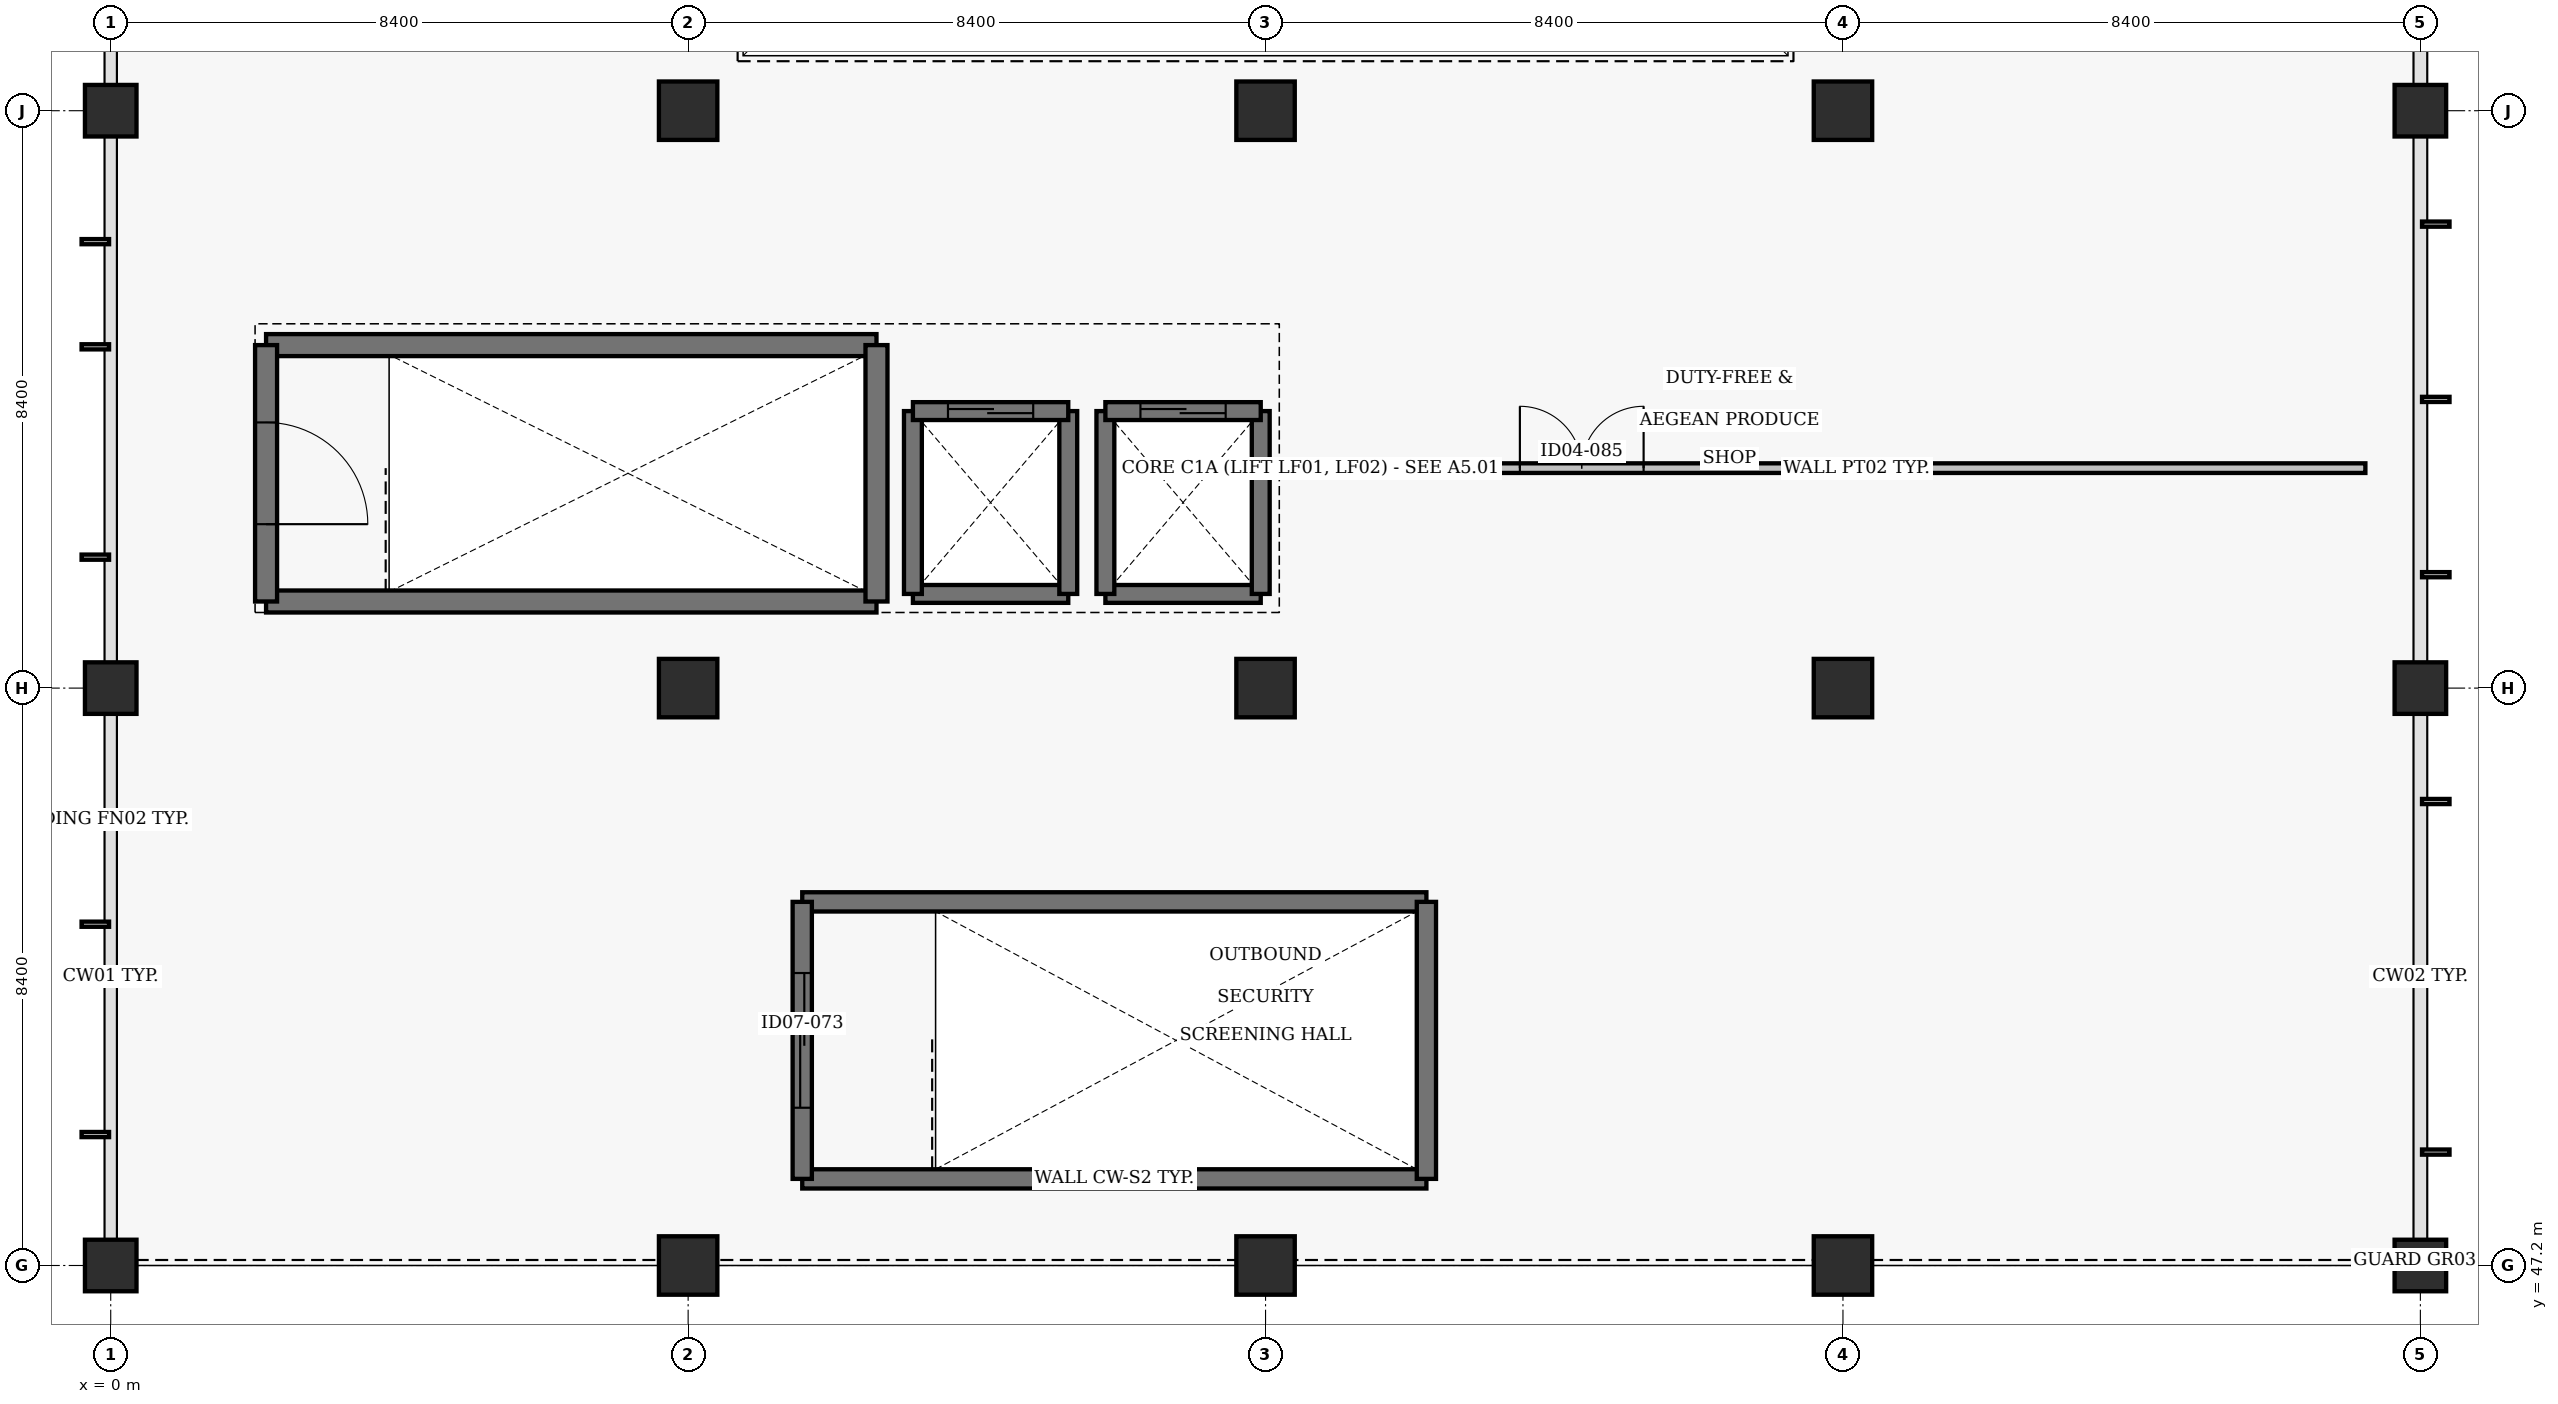
"""IFC4 building model, lengths in metres.
Left out: names, types, materials, properties, quantities, classifications, styles, units other than length and angle.
Written with IfcOpenShell. Run it as: python <this file> out.ifc"""

import sys

from ifc_helpers import new_model, si_unit, direction, frame, frame_2d, origin, origin_2d, place, context, subcontext, project, spatial, rectangle, circle, extrude, element, fill, save


model = new_model("IFC4")
c1 = context("Model", 3, precision=1e-05, world=origin(), true_north=direction((0.0, 1.0)))
c2 = subcontext(c1, "Body", "Model", "MODEL_VIEW")
j1 = project(units=[si_unit("LENGTHUNIT", "METRE"), si_unit("PLANEANGLEUNIT", "RADIAN")], contexts=[c1])
p1 = place(None, origin())
s1 = spatial("IfcSite", under=j1, at=p1, CompositionType="ELEMENT")
p2 = place(p1, origin())
s2 = spatial("IfcBuilding", under=s1, at=p2, CompositionType="ELEMENT")
p3 = place(p2, frame((0.0, 0.0, 5.44)))
s3 = spatial("IfcBuildingStorey", under=s2, at=p3, CompositionType="ELEMENT", Elevation=5.44)
for number, where, z_axis, x_axis in (
    (1, (0.0, 47.2, 0.0), (0.0, 0.0, 1.0), (1.0, 0.0, 0.0)),
    (2, (0.0, 55.6, 0.0), (0.0, 0.0, 1.0), (1.0, 0.0, 0.0)),
    (3, (0.0, 64.0, 0.0), (0.0, 0.0, 1.0), (1.0, 0.0, 0.0)),
):
    element("IfcColumn", number, at=place(p3, frame(where, z_axis=z_axis, x_axis=x_axis)), inside=s3, PredefinedType="COLUMN", context=c2, shape_type="SweptSolid", body=[
        extrude(rectangle(XDim=0.75, YDim=0.75, at=origin_2d()), origin(), (0.0, 0.0, 1.0), 4.16),
    ])
p4 = place(p3, frame((8.4, 47.2, 0.0), z_axis=(0.0, 0.0, 1.0), x_axis=(1.0, 0.0, 0.0)))
e4 = element("IfcColumn", 4, at=p4, inside=s3, PredefinedType="COLUMN", context=c2, shape_type="SweptSolid", body=[
    extrude(circle(Radius=0.425, at=origin_2d()), origin(), (0.0, 0.0, 1.0), 7.582),
])
p5 = place(p3, frame((8.4, 55.6, 0.0), z_axis=(0.0, 0.0, 1.0), x_axis=(1.0, 0.0, 0.0)))
e5 = element("IfcColumn", 5, at=p5, inside=s3, PredefinedType="COLUMN", context=c2, shape_type="SweptSolid", body=[
    extrude(circle(Radius=0.425, at=origin_2d()), origin(), (0.0, 0.0, 1.0), 8.296),
])
p6 = place(p3, frame((8.4, 64.0, 0.0), z_axis=(0.0, 0.0, 1.0), x_axis=(1.0, 0.0, 0.0)))
e6 = element("IfcColumn", 6, at=p6, inside=s3, PredefinedType="COLUMN", context=c2, shape_type="SweptSolid", body=[
    extrude(circle(Radius=0.425, at=origin_2d()), origin(), (0.0, 0.0, 1.0), 9.01),
])
p7 = place(p3, frame((16.8, 47.2, 0.0), z_axis=(0.0, 0.0, 1.0), x_axis=(1.0, 0.0, 0.0)))
e7 = element("IfcColumn", 7, at=p7, inside=s3, PredefinedType="COLUMN", context=c2, shape_type="SweptSolid", body=[
    extrude(circle(Radius=0.425, at=origin_2d()), origin(), (0.0, 0.0, 1.0), 10.06),
])
p8 = place(p3, frame((16.8, 55.6, 0.0), z_axis=(0.0, 0.0, 1.0), x_axis=(1.0, 0.0, 0.0)))
e8 = element("IfcColumn", 8, at=p8, inside=s3, PredefinedType="COLUMN", context=c2, shape_type="SweptSolid", body=[
    extrude(circle(Radius=0.425, at=origin_2d()), origin(), (0.0, 0.0, 1.0), 10.774),
])
p9 = place(p3, frame((16.8, 64.0, 0.0), z_axis=(0.0, 0.0, 1.0), x_axis=(1.0, 0.0, 0.0)))
e9 = element("IfcColumn", 9, at=p9, inside=s3, PredefinedType="COLUMN", context=c2, shape_type="SweptSolid", body=[
    extrude(circle(Radius=0.425, at=origin_2d()), origin(), (0.0, 0.0, 1.0), 11.489),
])
p10 = place(p3, frame((25.2, 47.2, 0.0), z_axis=(0.0, 0.0, 1.0), x_axis=(1.0, 0.0, 0.0)))
e10 = element("IfcColumn", 10, at=p10, inside=s3, PredefinedType="COLUMN", context=c2, shape_type="SweptSolid", body=[
    extrude(circle(Radius=0.425, at=origin_2d()), origin(), (0.0, 0.0, 1.0), 7.582),
])
p11 = place(p3, frame((25.2, 55.6, 0.0), z_axis=(0.0, 0.0, 1.0), x_axis=(1.0, 0.0, 0.0)))
e11 = element("IfcColumn", 11, at=p11, inside=s3, PredefinedType="COLUMN", context=c2, shape_type="SweptSolid", body=[
    extrude(circle(Radius=0.425, at=origin_2d()), origin(), (0.0, 0.0, 1.0), 8.296),
])
p12 = place(p3, frame((25.2, 64.0, 0.0), z_axis=(0.0, 0.0, 1.0), x_axis=(1.0, 0.0, 0.0)))
e12 = element("IfcColumn", 12, at=p12, inside=s3, PredefinedType="COLUMN", context=c2, shape_type="SweptSolid", body=[
    extrude(circle(Radius=0.425, at=origin_2d()), origin(), (0.0, 0.0, 1.0), 9.01),
])
for number, where, z_axis, x_axis in (
    (13, (33.6, 47.2, 0.0), (0.0, 0.0, 1.0), (1.0, 0.0, 0.0)),
    (14, (33.6, 55.6, 0.0), (0.0, 0.0, 1.0), (1.0, 0.0, 0.0)),
    (15, (33.6, 64.0, 0.0), (0.0, 0.0, 1.0), (1.0, 0.0, 0.0)),
):
    element("IfcColumn", number, at=place(p3, frame(where, z_axis=z_axis, x_axis=x_axis)), inside=s3, PredefinedType="COLUMN", context=c2, shape_type="SweptSolid", body=[
        extrude(rectangle(XDim=0.75, YDim=0.75, at=origin_2d()), origin(), (0.0, 0.0, 1.0), 4.16),
    ])
for number, where, z_axis, x_axis in (
    (16, (2.26, 56.86, 0.0), (0.0, 0.0, 1.0), (1.0, 0.0, 0.0)),
    (17, (2.26, 60.59, 0.0), (0.0, 0.0, 1.0), (1.0, 0.0, 0.0)),
):
    element("IfcWall", number, at=place(p3, frame(where, z_axis=z_axis, x_axis=x_axis)), inside=s3, PredefinedType="SHEAR", context=c2, shape_type="SweptSolid", body=[
        extrude(rectangle(XDim=8.88, YDim=0.32, at=frame_2d((4.44, 0.0))), origin(), (0.0, 0.0, 1.0), 4.16),
    ])
p13 = place(p3, frame((2.26, 60.59, 0.0), z_axis=(0.0, 0.0, 1.0), x_axis=(0.0, -1.0, 0.0)))
e18 = element("IfcWall", 18, at=p13, inside=s3, PredefinedType="SHEAR", context=c2, shape_type="SweptSolid", body=[
    extrude(rectangle(XDim=3.73, YDim=0.32, at=frame_2d((1.865, 0.0))), origin(), (0.0, 0.0, 1.0), 4.16),
])
p14 = place(p13, frame((1.125, 0.0, 0.0)))
e19 = element("IfcOpeningElement", 19, at=p14, cuts=e18, PredefinedType="OPENING", context=c2, shape_type="SweptSolid", body=[
    extrude(rectangle(XDim=1.48, YDim=2.15, at=frame_2d((0.74, 1.075))), frame((0.0, 0.17, 0.0), z_axis=(0.0, -1.0, 0.0), x_axis=(1.0, 0.0, 0.0)), (0.0, 0.0, 1.0), 0.34),
])
p15 = place(p3, frame((11.14, 56.86, 0.0), z_axis=(0.0, 0.0, 1.0), x_axis=(0.0, 1.0, 0.0)))
e20 = element("IfcWall", 20, at=p15, inside=s3, PredefinedType="SHEAR", context=c2, shape_type="SweptSolid", body=[
    extrude(rectangle(XDim=3.73, YDim=0.32, at=frame_2d((1.865, 0.0))), origin(), (0.0, 0.0, 1.0), 4.16),
])
p16 = place(p3, frame((11.67, 56.97, 0.0), z_axis=(0.0, 0.0, 1.0), x_axis=(1.0, 0.0, 0.0)))
e21 = element("IfcWall", 21, at=p16, inside=s3, PredefinedType="SHEAR", context=c2, shape_type="SweptSolid", body=[
    extrude(rectangle(XDim=2.26, YDim=0.26, at=frame_2d((1.13, 0.0))), origin(), (0.0, 0.0, 1.0), 4.16),
])
for number, where, z_axis, x_axis in (
    (22, (13.93, 56.97, 0.0), (0.0, 0.0, 1.0), (0.0, 1.0, 0.0)),
    (23, (11.67, 59.63, 0.0), (0.0, 0.0, 1.0), (0.0, -1.0, 0.0)),
):
    element("IfcWall", number, at=place(p3, frame(where, z_axis=z_axis, x_axis=x_axis)), inside=s3, PredefinedType="SHEAR", context=c2, shape_type="SweptSolid", body=[
        extrude(rectangle(XDim=2.66, YDim=0.26, at=frame_2d((1.33, 0.0))), origin(), (0.0, 0.0, 1.0), 4.16),
    ])
p17 = place(p3, frame((11.67, 59.63, 0.0), z_axis=(0.0, 0.0, 1.0), x_axis=(1.0, 0.0, 0.0)))
e24 = element("IfcWall", 24, at=p17, inside=s3, PredefinedType="SHEAR", context=c2, shape_type="SweptSolid", body=[
    extrude(rectangle(XDim=2.26, YDim=0.26, at=frame_2d((1.13, 0.0))), origin(), (0.0, 0.0, 1.0), 4.16),
])
p18 = place(p17, frame((0.51, 0.0, 0.0)))
e25 = element("IfcOpeningElement", 25, at=p18, cuts=e24, PredefinedType="OPENING", context=c2, shape_type="SweptSolid", body=[
    extrude(rectangle(XDim=1.24, YDim=2.14, at=frame_2d((0.62, 1.07))), frame((0.0, 0.14, 0.0), z_axis=(0.0, -1.0, 0.0), x_axis=(1.0, 0.0, 0.0)), (0.0, 0.0, 1.0), 0.28),
])
p19 = place(p3, frame((14.47, 56.97, 0.0), z_axis=(0.0, 0.0, 1.0), x_axis=(1.0, 0.0, 0.0)))
e26 = element("IfcWall", 26, at=p19, inside=s3, PredefinedType="SHEAR", context=c2, shape_type="SweptSolid", body=[
    extrude(rectangle(XDim=2.26, YDim=0.26, at=frame_2d((1.13, 0.0))), origin(), (0.0, 0.0, 1.0), 4.16),
])
for number, where, z_axis, x_axis in (
    (27, (16.73, 56.97, 0.0), (0.0, 0.0, 1.0), (0.0, 1.0, 0.0)),
    (28, (14.47, 59.63, 0.0), (0.0, 0.0, 1.0), (0.0, -1.0, 0.0)),
):
    element("IfcWall", number, at=place(p3, frame(where, z_axis=z_axis, x_axis=x_axis)), inside=s3, PredefinedType="SHEAR", context=c2, shape_type="SweptSolid", body=[
        extrude(rectangle(XDim=2.66, YDim=0.26, at=frame_2d((1.33, 0.0))), origin(), (0.0, 0.0, 1.0), 4.16),
    ])
p20 = place(p3, frame((14.47, 59.63, 0.0), z_axis=(0.0, 0.0, 1.0), x_axis=(1.0, 0.0, 0.0)))
e29 = element("IfcWall", 29, at=p20, inside=s3, PredefinedType="SHEAR", context=c2, shape_type="SweptSolid", body=[
    extrude(rectangle(XDim=2.26, YDim=0.26, at=frame_2d((1.13, 0.0))), origin(), (0.0, 0.0, 1.0), 4.16),
])
p21 = place(p20, frame((0.51, 0.0, 0.0)))
e30 = element("IfcOpeningElement", 30, at=p21, cuts=e29, PredefinedType="OPENING", context=c2, shape_type="SweptSolid", body=[
    extrude(rectangle(XDim=1.24, YDim=2.14, at=frame_2d((0.62, 1.07))), frame((0.0, 0.14, 0.0), z_axis=(0.0, -1.0, 0.0), x_axis=(1.0, 0.0, 0.0)), (0.0, 0.0, 1.0), 0.28),
])
for number, where, z_axis, x_axis in (
    (31, (10.06, 48.46, 0.0), (0.0, 0.0, 1.0), (1.0, 0.0, 0.0)),
    (32, (10.06, 52.49, 0.0), (0.0, 0.0, 1.0), (1.0, 0.0, 0.0)),
):
    element("IfcWall", number, at=place(p3, frame(where, z_axis=z_axis, x_axis=x_axis)), inside=s3, PredefinedType="SHEAR", context=c2, shape_type="SweptSolid", body=[
        extrude(rectangle(XDim=9.08, YDim=0.28, at=frame_2d((4.54, 0.0))), origin(), (0.0, 0.0, 1.0), 4.16),
    ])
p22 = place(p3, frame((10.06, 52.49, 0.0), z_axis=(0.0, 0.0, 1.0), x_axis=(0.0, -1.0, 0.0)))
e33 = element("IfcWall", 33, at=p22, inside=s3, PredefinedType="SHEAR", context=c2, shape_type="SweptSolid", body=[
    extrude(rectangle(XDim=4.03, YDim=0.28, at=frame_2d((2.015, 0.0))), origin(), (0.0, 0.0, 1.0), 4.16),
])
p23 = place(p22, frame((1.035, 0.0, 0.0)))
e34 = element("IfcOpeningElement", 34, at=p23, cuts=e33, PredefinedType="OPENING", context=c2, shape_type="SweptSolid", body=[
    extrude(rectangle(XDim=1.96, YDim=2.22, at=frame_2d((0.98, 1.11))), frame((0.0, 0.15, 0.0), z_axis=(0.0, -1.0, 0.0), x_axis=(1.0, 0.0, 0.0)), (0.0, 0.0, 1.0), 0.3),
])
p24 = place(p3, frame((19.14, 48.46, 0.0), z_axis=(0.0, 0.0, 1.0), x_axis=(0.0, 1.0, 0.0)))
e35 = element("IfcWall", 35, at=p24, inside=s3, PredefinedType="SHEAR", context=c2, shape_type="SweptSolid", body=[
    extrude(rectangle(XDim=4.03, YDim=0.28, at=frame_2d((2.015, 0.0))), origin(), (0.0, 0.0, 1.0), 4.16),
])
p25 = place(p3, frame((18.0, 58.8, 0.0), z_axis=(0.0, 0.0, 1.0), x_axis=(1.0, 0.0, 0.0)))
e36 = element("IfcWall", 36, at=p25, inside=s3, PredefinedType="PARTITIONING", context=c2, shape_type="SweptSolid", body=[
    extrude(rectangle(XDim=14.8, YDim=0.14, at=frame_2d((7.4, 0.0))), origin(), (0.0, 0.0, 1.0), 2.9),
])
p26 = place(p25, frame((2.5, 0.0, 0.0)))
e37 = element("IfcOpeningElement", 37, at=p26, cuts=e36, PredefinedType="OPENING", context=c2, shape_type="SweptSolid", body=[
    extrude(rectangle(XDim=1.8, YDim=2.18, at=frame_2d((0.9, 1.09))), frame((0.0, 0.08, 0.0), z_axis=(0.0, -1.0, 0.0), x_axis=(1.0, 0.0, 0.0)), (0.0, 0.0, 1.0), 0.16),
])
p27 = place(p14, origin())
e38 = element("IfcDoor", 38, at=p27, inside=s3, OperationType="SINGLE_SWING_RIGHT", PredefinedType="DOOR", context=c2, shape_type="SweptSolid", body=[
    extrude(rectangle(XDim=1.48, YDim=2.15, at=frame_2d((0.74, 1.075))), frame((0.0, 0.025, 0.0), z_axis=(0.0, -1.0, 0.0), x_axis=(1.0, 0.0, 0.0)), (0.0, 0.0, 1.0), 0.05),
])
fill(e19, e38)
p28 = place(p18, origin())
e39 = element("IfcDoor", 39, at=p28, inside=s3, OperationType="DOUBLE_DOOR_SLIDING", PredefinedType="DOOR", context=c2, shape_type="SweptSolid", body=[
    extrude(rectangle(XDim=1.24, YDim=2.14, at=frame_2d((0.62, 1.07))), frame((0.0, 0.025, 0.0), z_axis=(0.0, -1.0, 0.0), x_axis=(1.0, 0.0, 0.0)), (0.0, 0.0, 1.0), 0.05),
])
fill(e25, e39)
p29 = place(p21, origin())
e40 = element("IfcDoor", 40, at=p29, inside=s3, OperationType="DOUBLE_DOOR_SLIDING", PredefinedType="DOOR", context=c2, shape_type="SweptSolid", body=[
    extrude(rectangle(XDim=1.24, YDim=2.14, at=frame_2d((0.62, 1.07))), frame((0.0, 0.025, 0.0), z_axis=(0.0, -1.0, 0.0), x_axis=(1.0, 0.0, 0.0)), (0.0, 0.0, 1.0), 0.05),
])
fill(e30, e40)
p30 = place(p23, origin())
e41 = element("IfcDoor", 41, at=p30, inside=s3, OperationType="DOUBLE_DOOR_SLIDING", PredefinedType="DOOR", context=c2, shape_type="SweptSolid", body=[
    extrude(rectangle(XDim=1.96, YDim=2.22, at=frame_2d((0.98, 1.11))), frame((0.0, 0.025, 0.0), z_axis=(0.0, -1.0, 0.0), x_axis=(1.0, 0.0, 0.0)), (0.0, 0.0, 1.0), 0.05),
])
fill(e34, e41)
p31 = place(p26, origin())
e42 = element("IfcDoor", 42, at=p31, inside=s3, OperationType="DOUBLE_DOOR_SINGLE_SWING", PredefinedType="DOOR", context=c2, shape_type="SweptSolid", body=[
    extrude(rectangle(XDim=1.8, YDim=2.18, at=frame_2d((0.9, 1.09))), frame((0.0, 0.025, 0.0), z_axis=(0.0, -1.0, 0.0), x_axis=(1.0, 0.0, 0.0)), (0.0, 0.0, 1.0), 0.05),
])
fill(e37, e42)
save(model, sys.argv[1])
